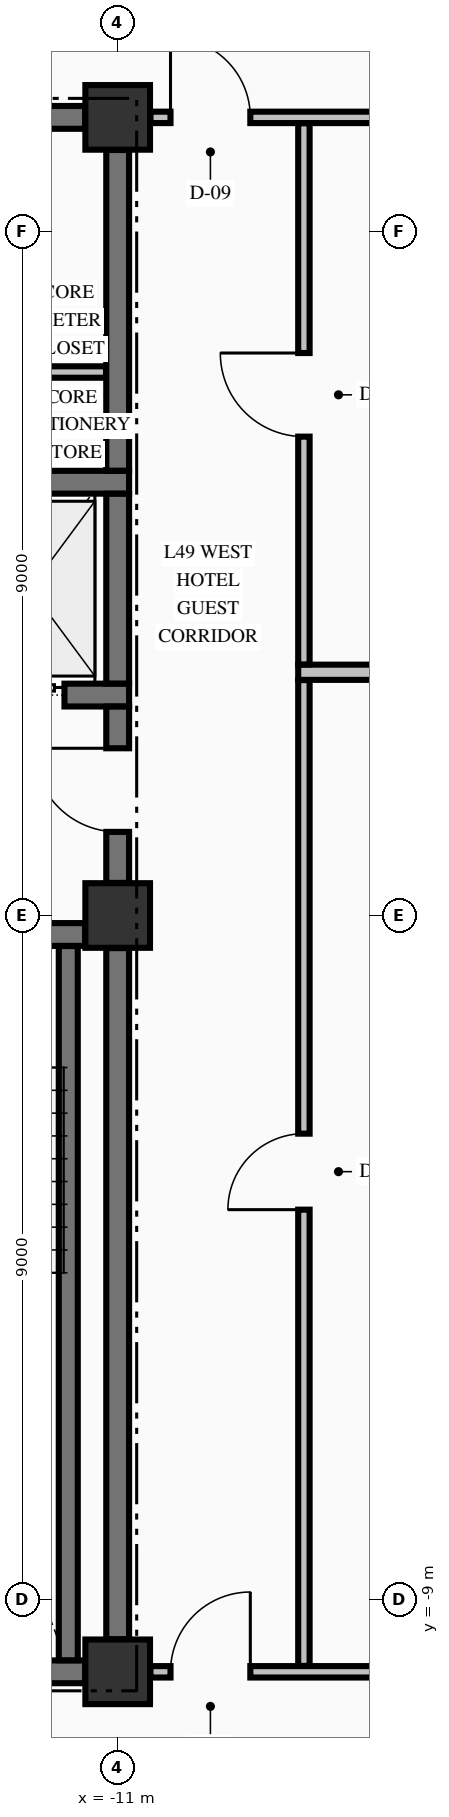
"""IFC4 building model, lengths in metres.
Left out: names, types, materials, properties, quantities, classifications, styles, units other than length and angle.
Written with IfcOpenShell. Run it as: python <this file> out.ifc"""

import sys

from ifc_helpers import new_model, si_unit, direction, frame, frame_2d, origin, origin_2d, place, context, subcontext, project, spatial, rectangle, extrude, element, fill, save


model = new_model("IFC4")
c1 = context("Model", 3, precision=1e-05, world=origin(), true_north=direction((0.0, 1.0)))
c2 = subcontext(c1, "Body", "Model", "MODEL_VIEW")
j1 = project(units=[si_unit("LENGTHUNIT", "METRE"), si_unit("PLANEANGLEUNIT", "RADIAN")], contexts=[c1])
p1 = place(None, origin())
s1 = spatial("IfcSite", under=j1, at=p1, CompositionType="ELEMENT")
p2 = place(p1, origin())
s2 = spatial("IfcBuilding", under=s1, at=p2, CompositionType="ELEMENT")
p3 = place(p2, frame((0.0, 0.0, 191.46)))
s3 = spatial("IfcBuildingStorey", under=s2, at=p3, CompositionType="ELEMENT", Elevation=191.46)
for number, where, z_axis, x_axis in (
    (1, (-11.0, -9.95, -0.425), (0.0, 0.0, 1.0), (1.0, 0.0, 0.0)),
    (2, (-11.0, 0.0, -0.425), (0.0, 0.0, 1.0), (1.0, 0.0, 0.0)),
    (3, (-11.0, 10.5, -0.425), (0.0, 0.0, 1.0), (1.0, 0.0, 0.0)),
):
    element("IfcColumn", number, at=place(p3, frame(where, z_axis=z_axis, x_axis=x_axis)), inside=s3, PredefinedType="COLUMN", context=c2, shape_type="SweptSolid", body=[
        extrude(rectangle(XDim=0.85, YDim=0.85, at=origin_2d()), origin(), (0.0, 0.0, 1.0), 3.55),
    ])
p4 = place(p3, frame((-14.7, -9.95, 0.0), z_axis=(0.0, 0.0, 1.0), x_axis=(1.0, 0.0, 0.0)))
e4 = element("IfcWall", 4, at=p4, inside=s3, PredefinedType="SHEAR", context=c2, shape_type="SweptSolid", body=[
    extrude(rectangle(XDim=3.271, YDim=0.3, at=frame_2d((1.635, 0.0))), origin(), (0.0, 0.0, 1.0), 3.125),
])
p5 = place(p3, frame((-19.571, -0.25, 0.0), z_axis=(0.0, 0.0, 1.0), x_axis=(1.0, 0.0, 0.0)))
e5 = element("IfcWall", 5, at=p5, inside=s3, PredefinedType="SHEAR", context=c2, shape_type="SweptSolid", body=[
    extrude(rectangle(XDim=8.142, YDim=0.3, at=frame_2d((4.071, 0.0))), origin(), (0.0, 0.0, 1.0), 3.125),
])
p6 = place(p5, frame((5.871, 0.0, 0.0)))
e6 = element("IfcOpeningElement", 6, at=p6, cuts=e5, PredefinedType="OPENING", context=c2, shape_type="SweptSolid", body=[
    extrude(rectangle(XDim=1.1, YDim=2.15, at=frame_2d((0.55, 1.075))), frame((0.0, 0.16, 0.0), z_axis=(0.0, -1.0, 0.0), x_axis=(1.0, 0.0, 0.0)), (0.0, 0.0, 1.0), 0.32),
])
p7 = place(p3, frame((-14.875, 2.9, 0.0), z_axis=(0.0, 0.0, 1.0), x_axis=(1.0, 0.0, 0.0)))
e7 = element("IfcWall", 7, at=p7, inside=s3, PredefinedType="SHEAR", context=c2, shape_type="SweptSolid", body=[
    extrude(rectangle(XDim=4.025, YDim=0.3, at=frame_2d((2.012, 0.0))), origin(), (0.0, 0.0, 1.0), 3.125),
])
p8 = place(p7, frame((2.075, 0.0, 0.0)))
e8 = element("IfcOpeningElement", 8, at=p8, cuts=e7, PredefinedType="OPENING", context=c2, shape_type="SweptSolid", body=[
    extrude(rectangle(XDim=1.1, YDim=2.2, at=frame_2d((0.55, 1.1))), frame((0.0, 0.16, 0.0), z_axis=(0.0, -1.0, 0.0), x_axis=(1.0, 0.0, 0.0)), (0.0, 0.0, 1.0), 0.32),
])
p9 = place(p3, frame((-14.875, 5.7, 0.0), z_axis=(0.0, 0.0, 1.0), x_axis=(1.0, 0.0, 0.0)))
e9 = element("IfcWall", 9, at=p9, inside=s3, PredefinedType="SHEAR", context=c2, shape_type="SweptSolid", body=[
    extrude(rectangle(XDim=4.025, YDim=0.3, at=frame_2d((2.012, 0.0))), origin(), (0.0, 0.0, 1.0), 3.125),
])
p10 = place(p3, frame((-14.7, 10.5, 0.0), z_axis=(0.0, 0.0, 1.0), x_axis=(1.0, 0.0, 0.0)))
e10 = element("IfcWall", 10, at=p10, inside=s3, PredefinedType="SHEAR", context=c2, shape_type="SweptSolid", body=[
    extrude(rectangle(XDim=3.271, YDim=0.3, at=frame_2d((1.635, 0.0))), origin(), (0.0, 0.0, 1.0), 3.125),
])
p11 = place(p10, frame((0.305, 0.0, 0.0)))
e11 = element("IfcOpeningElement", 11, at=p11, cuts=e10, PredefinedType="OPENING", context=c2, shape_type="SweptSolid", body=[
    extrude(rectangle(XDim=0.95, YDim=2.15, at=frame_2d((0.475, 1.075))), frame((0.0, 0.16, 0.0), z_axis=(0.0, -1.0, 0.0), x_axis=(1.0, 0.0, 0.0)), (0.0, 0.0, 1.0), 0.32),
])
p12 = place(p3, frame((-10.569, -9.95, 0.0), z_axis=(0.0, 0.0, 1.0), x_axis=(1.0, 0.0, 0.0)))
e12 = element("IfcWall", 12, at=p12, inside=s3, PredefinedType="PARTITIONING", context=c2, shape_type="SweptSolid", body=[
    extrude(rectangle(XDim=21.138, YDim=0.15, at=frame_2d((10.569, 0.0))), origin(), (0.0, 0.0, 1.0), 3.125),
])
p13 = place(p12, frame((0.264, 0.0, 0.0)))
e13 = element("IfcOpeningElement", 13, at=p13, cuts=e12, PredefinedType="OPENING", context=c2, shape_type="SweptSolid", body=[
    extrude(rectangle(XDim=1.05, YDim=2.15, at=frame_2d((0.525, 1.075))), frame((0.0, 0.085, 0.0), z_axis=(0.0, -1.0, 0.0), x_axis=(1.0, 0.0, 0.0)), (0.0, 0.0, 1.0), 0.17),
])
p14 = place(p12, frame((19.824, 0.0, 0.0)))
e14 = element("IfcOpeningElement", 14, at=p14, cuts=e12, PredefinedType="OPENING", context=c2, shape_type="SweptSolid", body=[
    extrude(rectangle(XDim=1.05, YDim=2.15, at=frame_2d((0.525, 1.075))), frame((0.0, 0.085, 0.0), z_axis=(0.0, -1.0, 0.0), x_axis=(1.0, 0.0, 0.0)), (0.0, 0.0, 1.0), 0.17),
])
p15 = place(p12, frame((12.874, 0.0, 0.0)))
e15 = element("IfcOpeningElement", 15, at=p15, cuts=e12, PredefinedType="OPENING", context=c2, shape_type="SweptSolid", body=[
    extrude(rectangle(XDim=0.95, YDim=2.15, at=frame_2d((0.475, 1.075))), frame((0.0, 0.085, 0.0), z_axis=(0.0, -1.0, 0.0), x_axis=(1.0, 0.0, 0.0)), (0.0, 0.0, 1.0), 0.17),
])
p16 = place(p3, frame((-8.625, 3.2, 0.0), z_axis=(0.0, 0.0, 1.0), x_axis=(1.0, 0.0, 0.0)))
e16 = element("IfcWall", 16, at=p16, inside=s3, PredefinedType="PARTITIONING", context=c2, shape_type="SweptSolid", body=[
    extrude(rectangle(XDim=8.725, YDim=0.2, at=frame_2d((4.363, 0.0))), origin(), (0.0, 0.0, 1.0), 3.125),
])
p17 = place(p3, frame((-13.225, 7.15, 0.0), z_axis=(0.0, 0.0, 1.0), x_axis=(1.0, 0.0, 0.0)))
e17 = element("IfcWall", 17, at=p17, inside=s3, PredefinedType="PARTITIONING", context=c2, shape_type="SweptSolid", body=[
    extrude(rectangle(XDim=2.072, YDim=0.15, at=frame_2d((1.036, 0.0))), origin(), (0.0, 0.0, 1.0), 3.125),
])
p18 = place(p3, frame((-10.569, 10.5, 0.0), z_axis=(0.0, 0.0, 1.0), x_axis=(1.0, 0.0, 0.0)))
e18 = element("IfcWall", 18, at=p18, inside=s3, PredefinedType="PARTITIONING", context=c2, shape_type="SweptSolid", body=[
    extrude(rectangle(XDim=21.138, YDim=0.15, at=frame_2d((10.569, 0.0))), origin(), (0.0, 0.0, 1.0), 3.125),
])
p19 = place(p18, frame((0.264, 0.0, 0.0)))
e19 = element("IfcOpeningElement", 19, at=p19, cuts=e18, PredefinedType="OPENING", context=c2, shape_type="SweptSolid", body=[
    extrude(rectangle(XDim=1.05, YDim=2.15, at=frame_2d((0.525, 1.075))), frame((0.0, 0.085, 0.0), z_axis=(0.0, -1.0, 0.0), x_axis=(1.0, 0.0, 0.0)), (0.0, 0.0, 1.0), 0.17),
])
p20 = place(p18, frame((19.824, 0.0, 0.0)))
e20 = element("IfcOpeningElement", 20, at=p20, cuts=e18, PredefinedType="OPENING", context=c2, shape_type="SweptSolid", body=[
    extrude(rectangle(XDim=1.05, YDim=2.15, at=frame_2d((0.525, 1.075))), frame((0.0, 0.085, 0.0), z_axis=(0.0, -1.0, 0.0), x_axis=(1.0, 0.0, 0.0)), (0.0, 0.0, 1.0), 0.17),
])
p21 = place(p3, frame((-11.65, -9.798, 0.0), z_axis=(0.0, 0.0, 1.0), x_axis=(0.0, 1.0, 0.0)))
e21 = element("IfcWall", 21, at=p21, inside=s3, PredefinedType="SOLIDWALL", context=c2, shape_type="SweptSolid", body=[
    extrude(rectangle(XDim=9.396, YDim=0.25, at=frame_2d((4.698, 0.0))), origin(), (0.0, 0.0, 1.0), 3.125),
])
p22 = place(p3, frame((-11.0, -9.521, 0.0), z_axis=(0.0, 0.0, 1.0), x_axis=(0.0, 1.0, 0.0)))
e22 = element("IfcWall", 22, at=p22, inside=s3, PredefinedType="SHEAR", context=c2, shape_type="SweptSolid", body=[
    extrude(rectangle(XDim=9.092, YDim=0.3, at=frame_2d((4.546, 0.0))), origin(), (0.0, 0.0, 1.0), 3.125),
])
p23 = place(p3, frame((-11.0, 0.429, 0.0), z_axis=(0.0, 0.0, 1.0), x_axis=(0.0, 1.0, 0.0)))
e23 = element("IfcWall", 23, at=p23, inside=s3, PredefinedType="SHEAR", context=c2, shape_type="SweptSolid", body=[
    extrude(rectangle(XDim=2.319, YDim=0.3, at=frame_2d((1.16, 0.0))), origin(), (0.0, 0.0, 1.0), 3.125),
])
p24 = place(p23, frame((0.671, 0.0, 0.0)))
e24 = element("IfcOpeningElement", 24, at=p24, cuts=e23, PredefinedType="OPENING", context=c2, shape_type="SweptSolid", body=[
    extrude(rectangle(XDim=1.1, YDim=2.15, at=frame_2d((0.55, 1.075))), frame((0.0, 0.16, 0.0), z_axis=(0.0, -1.0, 0.0), x_axis=(1.0, 0.0, 0.0)), (0.0, 0.0, 1.0), 0.32),
])
p25 = place(p3, frame((-11.0, 3.052, 0.0), z_axis=(0.0, 0.0, 1.0), x_axis=(0.0, 1.0, 0.0)))
e25 = element("IfcWall", 25, at=p25, inside=s3, PredefinedType="SHEAR", context=c2, shape_type="SweptSolid", body=[
    extrude(rectangle(XDim=2.496, YDim=0.3, at=frame_2d((1.248, 0.0))), origin(), (0.0, 0.0, 1.0), 3.125),
])
p26 = place(p3, frame((-11.0, 5.852, 0.0), z_axis=(0.0, 0.0, 1.0), x_axis=(0.0, 1.0, 0.0)))
e26 = element("IfcWall", 26, at=p26, inside=s3, PredefinedType="SHEAR", context=c2, shape_type="SweptSolid", body=[
    extrude(rectangle(XDim=4.219, YDim=0.3, at=frame_2d((2.109, 0.0))), origin(), (0.0, 0.0, 1.0), 3.125),
])
p27 = place(p3, frame((-8.55, -9.872, 0.0), z_axis=(0.0, 0.0, 1.0), x_axis=(0.0, 1.0, 0.0)))
e27 = element("IfcWall", 27, at=p27, inside=s3, PredefinedType="PARTITIONING", context=c2, shape_type="SweptSolid", body=[
    extrude(rectangle(XDim=12.969, YDim=0.15, at=frame_2d((6.484, 0.0))), origin(), (0.0, 0.0, 1.0), 3.125),
])
p28 = place(p27, frame((6.002, 0.0, 0.0)))
e28 = element("IfcOpeningElement", 28, at=p28, cuts=e27, PredefinedType="OPENING", context=c2, shape_type="SweptSolid", body=[
    extrude(rectangle(XDim=1.0, YDim=2.15, at=frame_2d((0.5, 1.075))), frame((0.0, 0.085, 0.0), z_axis=(0.0, -1.0, 0.0), x_axis=(1.0, 0.0, 0.0)), (0.0, 0.0, 1.0), 0.17),
])
p29 = place(p3, frame((-8.55, 3.303, 0.0), z_axis=(0.0, 0.0, 1.0), x_axis=(0.0, 1.0, 0.0)))
e29 = element("IfcWall", 29, at=p29, inside=s3, PredefinedType="PARTITIONING", context=c2, shape_type="SweptSolid", body=[
    extrude(rectangle(XDim=7.119, YDim=0.15, at=frame_2d((3.56, 0.0))), origin(), (0.0, 0.0, 1.0), 3.125),
])
p30 = place(p29, frame((2.997, 0.0, 0.0)))
e30 = element("IfcOpeningElement", 30, at=p30, cuts=e29, PredefinedType="OPENING", context=c2, shape_type="SweptSolid", body=[
    extrude(rectangle(XDim=1.1, YDim=2.15, at=frame_2d((0.55, 1.075))), frame((0.0, 0.085, 0.0), z_axis=(0.0, -1.0, 0.0), x_axis=(1.0, 0.0, 0.0)), (0.0, 0.0, 1.0), 0.17),
])
p31 = place(p24, origin())
e31 = element("IfcDoor", 31, at=p31, inside=s3, OperationType="SINGLE_SWING_RIGHT", PredefinedType="DOOR", context=c2, shape_type="SweptSolid", body=[
    extrude(rectangle(XDim=1.1, YDim=2.15, at=frame_2d((0.55, 1.075))), frame((0.0, 0.025, 0.0), z_axis=(0.0, -1.0, 0.0), x_axis=(1.0, 0.0, 0.0)), (0.0, 0.0, 1.0), 0.05),
])
fill(e24, e31)
p32 = place(p8, origin())
e32 = element("IfcDoor", 32, at=p32, inside=s3, OperationType="SLIDING_TO_LEFT", PredefinedType="DOOR", context=c2, shape_type="SweptSolid", body=[
    extrude(rectangle(XDim=1.1, YDim=2.2, at=frame_2d((0.55, 1.1))), frame((0.0, 0.025, 0.0), z_axis=(0.0, -1.0, 0.0), x_axis=(1.0, 0.0, 0.0)), (0.0, 0.0, 1.0), 0.05),
])
fill(e8, e32)
p33 = place(p19, origin())
e33 = element("IfcDoor", 33, at=p33, inside=s3, OperationType="SINGLE_SWING_LEFT", PredefinedType="DOOR", context=c2, shape_type="SweptSolid", body=[
    extrude(rectangle(XDim=1.05, YDim=2.15, at=frame_2d((0.525, 1.075))), frame((0.0, 0.025, 0.0), z_axis=(0.0, -1.0, 0.0), x_axis=(1.0, 0.0, 0.0)), (0.0, 0.0, 1.0), 0.05),
])
fill(e19, e33)
p34 = place(p13, origin())
e34 = element("IfcDoor", 34, at=p34, inside=s3, OperationType="SINGLE_SWING_RIGHT", PredefinedType="DOOR", context=c2, shape_type="SweptSolid", body=[
    extrude(rectangle(XDim=1.05, YDim=2.15, at=frame_2d((0.525, 1.075))), frame((0.0, 0.025, 0.0), z_axis=(0.0, -1.0, 0.0), x_axis=(1.0, 0.0, 0.0)), (0.0, 0.0, 1.0), 0.05),
])
fill(e13, e34)
p35 = place(p30, origin())
e35 = element("IfcDoor", 35, at=p35, inside=s3, OperationType="SINGLE_SWING_RIGHT", PredefinedType="DOOR", context=c2, shape_type="SweptSolid", body=[
    extrude(rectangle(XDim=1.1, YDim=2.15, at=frame_2d((0.55, 1.075))), frame((0.0, 0.025, 0.0), z_axis=(0.0, -1.0, 0.0), x_axis=(1.0, 0.0, 0.0)), (0.0, 0.0, 1.0), 0.05),
])
fill(e30, e35)
p36 = place(p28, origin())
e36 = element("IfcDoor", 36, at=p36, inside=s3, OperationType="SINGLE_SWING_LEFT", PredefinedType="DOOR", context=c2, shape_type="SweptSolid", body=[
    extrude(rectangle(XDim=1.0, YDim=2.15, at=frame_2d((0.5, 1.075))), frame((0.0, 0.025, 0.0), z_axis=(0.0, -1.0, 0.0), x_axis=(1.0, 0.0, 0.0)), (0.0, 0.0, 1.0), 0.05),
])
fill(e28, e36)
save(model, sys.argv[1])
